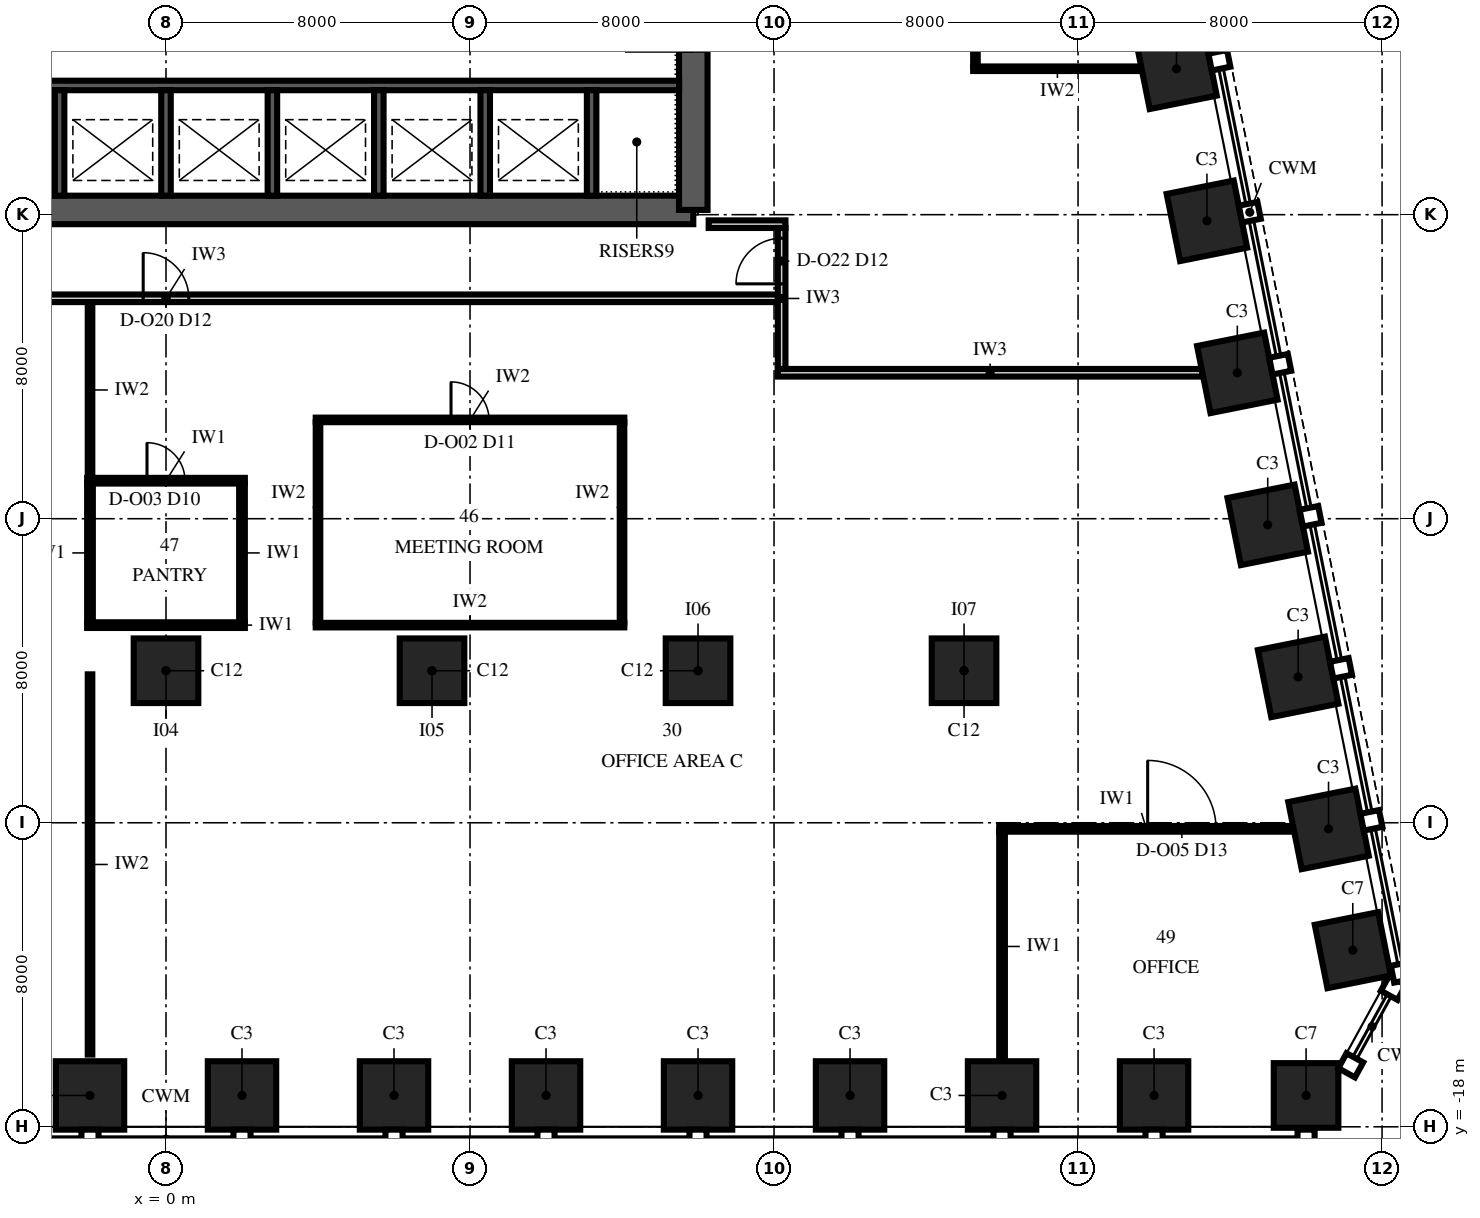
"""IFC4 building model, lengths in metres.
Left out: names, types, materials, properties, quantities, classifications, styles, units other than length and angle.
Written with IfcOpenShell. Run it as: python <this file> out.ifc"""

import sys

from ifc_helpers import new_model, si_unit, direction, frame, frame_2d, origin, origin_2d, place, context, subcontext, project, spatial, polyline, rectangle, outline, extrude, element, fill, save


model = new_model("IFC4")
c1 = context("Model", 3, precision=1e-05, world=origin(), true_north=direction((0.0, 1.0)))
c2 = subcontext(c1, "Body", "Model", "MODEL_VIEW")
j1 = project(units=[si_unit("LENGTHUNIT", "METRE"), si_unit("PLANEANGLEUNIT", "RADIAN")], contexts=[c1])
p1 = place(None, origin())
s1 = spatial("IfcSite", under=j1, at=p1, CompositionType="ELEMENT")
p2 = place(p1, origin())
s2 = spatial("IfcBuilding", under=s1, at=p2, CompositionType="ELEMENT")
p3 = place(p2, frame((0.0, 0.0, 115.0)))
s3 = spatial("IfcBuildingStorey", under=s2, at=p3, CompositionType="ELEMENT", Elevation=115.0)
for number, where, z_axis, x_axis in (
    (1, (-2.0, -17.175, 0.0), (0.0, 0.0, 1.0), (1.0, 0.0, 0.0)),
    (2, (2.0, -17.175, 0.0), (0.0, 0.0, 1.0), (1.0, 0.0, 0.0)),
    (3, (6.0, -17.175, 0.0), (0.0, 0.0, 1.0), (1.0, 0.0, 0.0)),
    (4, (10.0, -17.175, 0.0), (0.0, 0.0, 1.0), (1.0, 0.0, 0.0)),
    (5, (14.0, -17.175, 0.0), (0.0, 0.0, 1.0), (1.0, 0.0, 0.0)),
    (6, (18.0, -17.175, 0.0), (0.0, 0.0, 1.0), (1.0, 0.0, 0.0)),
    (7, (22.0, -17.175, 0.0), (0.0, 0.0, 1.0), (1.0, 0.0, 0.0)),
    (8, (26.0, -17.175, 0.0), (0.0, 0.0, 1.0), (1.0, 0.0, 0.0)),
):
    element("IfcColumn", number, at=place(p3, frame(where, z_axis=z_axis, x_axis=x_axis)), inside=s3, PredefinedType="COLUMN", context=c2, shape_type="SweptSolid", body=[
        extrude(rectangle(XDim=1.8, YDim=1.8, at=origin_2d()), origin(), (0.0, 0.0, 1.0), 4.0),
    ])
for number, where, z_axis, x_axis in (
    (9, (30.0, -17.175, 0.0), (0.0, 0.0, 1.0), (1.0, 0.0, 0.0)),
    (10, (31.229, -13.353, 0.0), (0.0, 0.0, 1.0), (-0.196, 0.981, 0.0)),
):
    element("IfcColumn", number, at=place(p3, frame(where, z_axis=z_axis, x_axis=x_axis)), inside=s3, PredefinedType="COLUMN", context=c2, shape_type="SweptSolid", body=[
        extrude(rectangle(XDim=1.7, YDim=1.7, at=origin_2d()), origin(), (0.0, 0.0, 1.0), 4.0),
    ])
for number, where, z_axis, x_axis in (
    (11, (30.591, -10.162, 0.0), (0.0, 0.0, 1.0), (-0.196, 0.981, 0.0)),
    (12, (29.791, -6.162, 0.0), (0.0, 0.0, 1.0), (-0.196, 0.981, 0.0)),
    (13, (28.991, -2.162, 0.0), (0.0, 0.0, 1.0), (-0.196, 0.981, 0.0)),
    (14, (28.191, 1.838, 0.0), (0.0, 0.0, 1.0), (-0.196, 0.981, 0.0)),
    (15, (27.391, 5.838, 0.0), (0.0, 0.0, 1.0), (-0.196, 0.981, 0.0)),
    (16, (26.591, 9.838, 0.0), (0.0, 0.0, 1.0), (-0.196, 0.981, 0.0)),
):
    element("IfcColumn", number, at=place(p3, frame(where, z_axis=z_axis, x_axis=x_axis)), inside=s3, PredefinedType="COLUMN", context=c2, shape_type="SweptSolid", body=[
        extrude(rectangle(XDim=1.8, YDim=1.8, at=origin_2d()), origin(), (0.0, 0.0, 1.0), 4.0),
    ])
for number, where, z_axis, x_axis in (
    (17, (0.0, -6.0, 0.0), (0.0, 0.0, 1.0), (1.0, 0.0, 0.0)),
    (18, (7.0, -6.0, 0.0), (0.0, 0.0, 1.0), (1.0, 0.0, 0.0)),
    (19, (14.0, -6.0, 0.0), (0.0, 0.0, 1.0), (1.0, 0.0, 0.0)),
    (20, (21.0, -6.0, 0.0), (0.0, 0.0, 1.0), (1.0, 0.0, 0.0)),
):
    element("IfcColumn", number, at=place(p3, frame(where, z_axis=z_axis, x_axis=x_axis)), inside=s3, PredefinedType="COLUMN", context=c2, shape_type="SweptSolid", body=[
        extrude(rectangle(XDim=1.7, YDim=1.7, at=origin_2d()), origin(), (0.0, 0.0, 1.0), 4.0),
    ])
p4 = place(p3, frame((-13.875, 6.125, 0.0), z_axis=(0.0, 0.0, 1.0), x_axis=(1.0, 0.0, 0.0)))
e21 = element("IfcWall", 21, at=p4, inside=s3, PredefinedType="SHEAR", context=c2, shape_type="SweptSolid", body=[
    extrude(rectangle(XDim=27.75, YDim=0.75, at=frame_2d((13.875, 0.0))), origin(), (0.0, 0.0, 1.0), 4.0),
])
p5 = place(p3, frame((13.875, 6.125, 0.0), z_axis=(0.0, 0.0, 1.0), x_axis=(0.0, 1.0, 0.0)))
e22 = element("IfcWall", 22, at=p5, inside=s3, PredefinedType="SHEAR", context=c2, shape_type="SweptSolid", body=[
    extrude(outline(polyline([(0.0, -0.375), (17.75, -0.375), (17.75, 0.0), (17.375, 0.0), (17.375, 0.375), (0.375, 0.375), (0.375, 0.0), (0.0, 0.0), (0.0, -0.375)])), origin(), (0.0, 0.0, 1.0), 4.0),
])
p6 = place(p5, frame((4.175, 0.0, 0.0)))
e23 = element("IfcOpeningElement", 23, at=p6, cuts=e22, PredefinedType="OPENING", context=c2, shape_type="SweptSolid", body=[
    extrude(rectangle(XDim=1.8, YDim=2.4, at=frame_2d((0.9, 1.2))), frame((0.0, 0.39, 0.0), z_axis=(0.0, -1.0, 0.0), x_axis=(1.0, 0.0, 0.0)), (0.0, 0.0, 1.0), 0.78),
])
p7 = place(p3, frame((-13.5, 9.4, 0.0), z_axis=(0.0, 0.0, 1.0), x_axis=(1.0, 0.0, 0.0)))
e24 = element("IfcWall", 24, at=p7, inside=s3, PredefinedType="SHEAR", context=c2, shape_type="SweptSolid", body=[
    extrude(rectangle(XDim=27.0, YDim=0.25, at=frame_2d((13.5, 0.0))), origin(), (0.0, 0.0, 1.0), 4.0),
])
p8 = place(p7, frame((0.35, 0.0, 0.0)))
e25 = element("IfcOpeningElement", 25, at=p8, cuts=e24, PredefinedType="OPENING", context=c2, shape_type="SweptSolid", body=[
    extrude(rectangle(XDim=1.1, YDim=2.1, at=frame_2d((0.55, 1.05))), frame((0.0, 0.14, 0.0), z_axis=(0.0, -1.0, 0.0), x_axis=(1.0, 0.0, 0.0)), (0.0, 0.0, 1.0), 0.28),
])
p9 = place(p7, frame((3.15, 0.0, 0.0)))
e26 = element("IfcOpeningElement", 26, at=p9, cuts=e24, PredefinedType="OPENING", context=c2, shape_type="SweptSolid", body=[
    extrude(rectangle(XDim=1.1, YDim=2.1, at=frame_2d((0.55, 1.05))), frame((0.0, 0.14, 0.0), z_axis=(0.0, -1.0, 0.0), x_axis=(1.0, 0.0, 0.0)), (0.0, 0.0, 1.0), 0.28),
])
p10 = place(p7, frame((5.95, 0.0, 0.0)))
e27 = element("IfcOpeningElement", 27, at=p10, cuts=e24, PredefinedType="OPENING", context=c2, shape_type="SweptSolid", body=[
    extrude(rectangle(XDim=1.1, YDim=2.1, at=frame_2d((0.55, 1.05))), frame((0.0, 0.14, 0.0), z_axis=(0.0, -1.0, 0.0), x_axis=(1.0, 0.0, 0.0)), (0.0, 0.0, 1.0), 0.28),
])
for number, where, z_axis, x_axis in (
    (28, (-2.8, 6.5, 0.0), (0.0, 0.0, 1.0), (0.0, 1.0, 0.0)),
    (29, (0.0, 6.5, 0.0), (0.0, 0.0, 1.0), (0.0, 1.0, 0.0)),
    (30, (2.8, 6.5, 0.0), (0.0, 0.0, 1.0), (0.0, 1.0, 0.0)),
    (31, (5.6, 6.5, 0.0), (0.0, 0.0, 1.0), (0.0, 1.0, 0.0)),
    (32, (8.4, 6.5, 0.0), (0.0, 0.0, 1.0), (0.0, 1.0, 0.0)),
    (33, (11.2, 6.5, 0.0), (0.0, 0.0, 1.0), (0.0, 1.0, 0.0)),
):
    element("IfcWall", number, at=place(p3, frame(where, z_axis=z_axis, x_axis=x_axis)), inside=s3, PredefinedType="SHEAR", context=c2, shape_type="SweptSolid", body=[
        extrude(rectangle(XDim=2.775, YDim=0.25, at=frame_2d((1.387, 0.0))), origin(), (0.0, 0.0, 1.0), 4.0),
    ])
p11 = place(p3, frame((21.925, -10.16, 0.0), z_axis=(0.0, 0.0, 1.0), x_axis=(1.0, 0.0, 0.0)))
e34 = element("IfcWall", 34, at=p11, inside=s3, PredefinedType="PARTITIONING", context=c2, shape_type="SweptSolid", body=[
    extrude(rectangle(XDim=7.748, YDim=0.15, at=frame_2d((3.874, 0.0))), origin(), (0.0, 0.0, 1.0), 3.25),
])
p12 = place(p11, frame((3.907, 0.0, 0.0)))
e35 = element("IfcOpeningElement", 35, at=p12, cuts=e34, PredefinedType="OPENING", context=c2, shape_type="SweptSolid", body=[
    extrude(rectangle(XDim=1.8, YDim=2.4, at=frame_2d((0.9, 1.2))), frame((0.0, 0.09, 0.0), z_axis=(0.0, -1.0, 0.0), x_axis=(1.0, 0.0, 0.0)), (0.0, 0.0, 1.0), 0.18),
])
p13 = place(p3, frame((-2.075, -4.8, 0.0), z_axis=(0.0, 0.0, 1.0), x_axis=(1.0, 0.0, 0.0)))
e36 = element("IfcWall", 36, at=p13, inside=s3, PredefinedType="PARTITIONING", context=c2, shape_type="SweptSolid", body=[
    extrude(rectangle(XDim=4.15, YDim=0.15, at=frame_2d((2.075, 0.0))), origin(), (0.0, 0.0, 1.0), 3.25),
])
p14 = place(p3, frame((3.94, -4.8, 0.0), z_axis=(0.0, 0.0, 1.0), x_axis=(1.0, 0.0, 0.0)))
e37 = element("IfcWall", 37, at=p14, inside=s3, PredefinedType="PARTITIONING", context=c2, shape_type="SweptSolid", body=[
    extrude(rectangle(XDim=8.12, YDim=0.12, at=frame_2d((4.06, 0.0))), origin(), (0.0, 0.0, 1.0), 3.25),
])
p15 = place(p3, frame((-2.075, -1.0, 0.0), z_axis=(0.0, 0.0, 1.0), x_axis=(1.0, 0.0, 0.0)))
e38 = element("IfcWall", 38, at=p15, inside=s3, PredefinedType="PARTITIONING", context=c2, shape_type="SweptSolid", body=[
    extrude(rectangle(XDim=4.15, YDim=0.15, at=frame_2d((2.075, 0.0))), origin(), (0.0, 0.0, 1.0), 3.85),
])
p16 = place(p15, frame((1.575, 0.0, 0.0)))
e39 = element("IfcOpeningElement", 39, at=p16, cuts=e38, PredefinedType="OPENING", context=c2, shape_type="SweptSolid", body=[
    extrude(rectangle(XDim=1.0, YDim=2.3, at=frame_2d((0.5, 1.15))), frame((0.0, 0.09, 0.0), z_axis=(0.0, -1.0, 0.0), x_axis=(1.0, 0.0, 0.0)), (0.0, 0.0, 1.0), 0.18),
])
p17 = place(p3, frame((3.94, 0.6, 0.0), z_axis=(0.0, 0.0, 1.0), x_axis=(1.0, 0.0, 0.0)))
e40 = element("IfcWall", 40, at=p17, inside=s3, PredefinedType="PARTITIONING", context=c2, shape_type="SweptSolid", body=[
    extrude(rectangle(XDim=8.12, YDim=0.12, at=frame_2d((4.06, 0.0))), origin(), (0.0, 0.0, 1.0), 3.25),
])
p18 = place(p17, frame((3.56, 0.0, 0.0)))
e41 = element("IfcOpeningElement", 41, at=p18, cuts=e40, PredefinedType="OPENING", context=c2, shape_type="SweptSolid", body=[
    extrude(rectangle(XDim=1.0, YDim=2.4, at=frame_2d((0.5, 1.2))), frame((0.0, 0.075, 0.0), z_axis=(0.0, -1.0, 0.0), x_axis=(1.0, 0.0, 0.0)), (0.0, 0.0, 1.0), 0.15),
])
p19 = place(p3, frame((16.1, 1.84, 0.0), z_axis=(0.0, 0.0, 1.0), x_axis=(1.0, 0.0, 0.0)))
e42 = element("IfcWall", 42, at=p19, inside=s3, PredefinedType="PARTITIONING", context=c2, shape_type="SweptSolid", body=[
    extrude(rectangle(XDim=11.173, YDim=0.2, at=frame_2d((5.586, 0.0))), origin(), (0.0, 0.0, 1.0), 3.25),
])
p20 = place(p3, frame((-16.1, 3.8, 0.0), z_axis=(0.0, 0.0, 1.0), x_axis=(1.0, 0.0, 0.0)))
e43 = element("IfcWall", 43, at=p20, inside=s3, PredefinedType="PARTITIONING", context=c2, shape_type="SweptSolid", body=[
    extrude(rectangle(XDim=32.2, YDim=0.2, at=frame_2d((16.1, 0.0))), origin(), (0.0, 0.0, 1.0), 3.25),
])
p21 = place(p20, frame((15.5, 0.0, 0.0)))
e44 = element("IfcOpeningElement", 44, at=p21, cuts=e43, PredefinedType="OPENING", context=c2, shape_type="SweptSolid", body=[
    extrude(rectangle(XDim=1.2, YDim=2.4, at=frame_2d((0.6, 1.2))), frame((0.0, 0.115, 0.0), z_axis=(0.0, -1.0, 0.0), x_axis=(1.0, 0.0, 0.0)), (0.0, 0.0, 1.0), 0.23),
])
p22 = place(p3, frame((14.28, 5.75, 0.0), z_axis=(0.0, 0.0, 1.0), x_axis=(1.0, 0.0, 0.0)))
e45 = element("IfcWall", 45, at=p22, inside=s3, PredefinedType="PARTITIONING", context=c2, shape_type="SweptSolid", body=[
    extrude(rectangle(XDim=2.02, YDim=0.2, at=frame_2d((1.01, 0.0))), origin(), (0.0, 0.0, 1.0), 3.85),
])
p23 = place(p3, frame((21.24, 9.84, 0.0), z_axis=(0.0, 0.0, 1.0), x_axis=(1.0, 0.0, 0.0)))
e46 = element("IfcWall", 46, at=p23, inside=s3, PredefinedType="PARTITIONING", context=c2, shape_type="SweptSolid", body=[
    extrude(rectangle(XDim=4.433, YDim=0.12, at=frame_2d((2.216, 0.0))), origin(), (0.0, 0.0, 1.0), 3.25),
])
for number, where, z_axis, x_axis in (
    (47, (-2.0, -4.725, 0.0), (0.0, 0.0, 1.0), (0.0, 1.0, 0.0)),
    (48, (2.0, -4.725, 0.0), (0.0, 0.0, 1.0), (0.0, 1.0, 0.0)),
):
    element("IfcWall", number, at=place(p3, frame(where, z_axis=z_axis, x_axis=x_axis)), inside=s3, PredefinedType="PARTITIONING", context=c2, shape_type="SweptSolid", body=[
        extrude(rectangle(XDim=3.65, YDim=0.15, at=frame_2d((1.825, 0.0))), origin(), (0.0, 0.0, 1.0), 3.25),
    ])
for number, where, z_axis, x_axis in (
    (49, (4.0, -4.74, 0.0), (0.0, 0.0, 1.0), (0.0, 1.0, 0.0)),
    (50, (12.0, -4.74, 0.0), (0.0, 0.0, 1.0), (0.0, 1.0, 0.0)),
):
    element("IfcWall", number, at=place(p3, frame(where, z_axis=z_axis, x_axis=x_axis)), inside=s3, PredefinedType="PARTITIONING", context=c2, shape_type="SweptSolid", body=[
        extrude(rectangle(XDim=5.28, YDim=0.12, at=frame_2d((2.64, 0.0))), origin(), (0.0, 0.0, 1.0), 3.85),
    ])
p24 = place(p3, frame((16.2, 1.94, 0.0), z_axis=(0.0, 0.0, 1.0), x_axis=(0.0, 1.0, 0.0)))
e51 = element("IfcWall", 51, at=p24, inside=s3, PredefinedType="PARTITIONING", context=c2, shape_type="SweptSolid", body=[
    extrude(rectangle(XDim=3.71, YDim=0.2, at=frame_2d((1.855, 0.0))), origin(), (0.0, 0.0, 1.0), 3.85),
])
p25 = place(p24, frame((2.24, 0.0, 0.0)))
e52 = element("IfcOpeningElement", 52, at=p25, cuts=e51, PredefinedType="OPENING", context=c2, shape_type="SweptSolid", body=[
    extrude(rectangle(XDim=1.2, YDim=2.4, at=frame_2d((0.6, 1.2))), frame((0.0, 0.115, 0.0), z_axis=(0.0, -1.0, 0.0), x_axis=(1.0, 0.0, 0.0)), (0.0, 0.0, 1.0), 0.23),
])
p26 = place(p3, frame((21.3, 9.9, 0.0), z_axis=(0.0, 0.0, 1.0), x_axis=(0.0, 1.0, 0.0)))
e53 = element("IfcWall", 53, at=p26, inside=s3, PredefinedType="PARTITIONING", context=c2, shape_type="SweptSolid", body=[
    extrude(rectangle(XDim=3.88, YDim=0.12, at=frame_2d((1.94, 0.0))), origin(), (0.0, 0.0, 1.0), 3.85),
])
p27 = place(p26, frame((1.44, 0.0, 0.0)))
e54 = element("IfcOpeningElement", 54, at=p27, cuts=e53, PredefinedType="OPENING", context=c2, shape_type="SweptSolid", body=[
    extrude(rectangle(XDim=1.0, YDim=2.4, at=frame_2d((0.5, 1.2))), frame((0.0, 0.075, 0.0), z_axis=(0.0, -1.0, 0.0), x_axis=(1.0, 0.0, 0.0)), (0.0, 0.0, 1.0), 0.15),
])
p28 = place(p3, frame((22.0, -16.275, 0.0), z_axis=(0.0, 0.0, 1.0), x_axis=(0.0, 1.0, 0.0)))
e55 = element("IfcWall", 55, at=p28, inside=s3, PredefinedType="PARTITIONING", context=c2, shape_type="SweptSolid", body=[
    extrude(rectangle(XDim=6.04, YDim=0.15, at=frame_2d((3.02, 0.0))), origin(), (0.0, 0.0, 1.0), 3.25),
])
p29 = place(p3, frame((-1.999, -16.1, 0.0), z_axis=(0.0, 0.0, 1.0), x_axis=(0.0, 1.0, 0.0)))
e56 = element("IfcWall", 56, at=p29, inside=s3, PredefinedType="PARTITIONING", context=c2, shape_type="SweptSolid", body=[
    extrude(rectangle(XDim=10.005, YDim=0.12, at=frame_2d((5.002, 0.0))), origin(), (0.0, 0.0, 1.0), 2.842),
])
p30 = place(p3, frame((-1.999, -0.905, 0.0), z_axis=(0.0, 0.0, 1.0), x_axis=(0.0, 1.0, 0.0)))
e57 = element("IfcWall", 57, at=p30, inside=s3, PredefinedType="PARTITIONING", context=c2, shape_type="SweptSolid", body=[
    extrude(rectangle(XDim=4.585, YDim=0.12, at=frame_2d((2.292, 0.0))), origin(), (0.0, 0.0, 1.0), 3.85),
])
p31 = place(p18, origin())
e58 = element("IfcDoor", 58, at=p31, inside=s3, OperationType="SINGLE_SWING_RIGHT", PredefinedType="DOOR", context=c2, shape_type="SweptSolid", body=[
    extrude(rectangle(XDim=1.0, YDim=2.4, at=frame_2d((0.5, 1.2))), frame((0.0, 0.06, 0.0), z_axis=(0.0, -1.0, 0.0), x_axis=(1.0, 0.0, 0.0)), (0.0, 0.0, 1.0), 0.12),
])
fill(e41, e58)
p32 = place(p16, origin())
e59 = element("IfcDoor", 59, at=p32, inside=s3, OperationType="SINGLE_SWING_LEFT", PredefinedType="DOOR", context=c2, shape_type="SweptSolid", body=[
    extrude(rectangle(XDim=1.0, YDim=2.3, at=frame_2d((0.5, 1.15))), frame((0.0, 0.075, 0.0), z_axis=(0.0, -1.0, 0.0), x_axis=(1.0, 0.0, 0.0)), (0.0, 0.0, 1.0), 0.149),
])
fill(e39, e59)
p33 = place(p12, origin())
e60 = element("IfcDoor", 60, at=p33, inside=s3, OperationType="DOUBLE_DOOR_SINGLE_SWING", PredefinedType="DOOR", context=c2, shape_type="SweptSolid", body=[
    extrude(rectangle(XDim=1.8, YDim=2.4, at=frame_2d((0.9, 1.2))), frame((0.0, 0.075, 0.0), z_axis=(0.0, -1.0, 0.0), x_axis=(1.0, 0.0, 0.0)), (0.0, 0.0, 1.0), 0.149),
])
fill(e35, e60)
p34 = place(p21, origin())
e61 = element("IfcDoor", 61, at=p34, inside=s3, OperationType="SINGLE_SWING_LEFT", PredefinedType="DOOR", context=c2, shape_type="SweptSolid", body=[
    extrude(rectangle(XDim=1.2, YDim=2.4, at=frame_2d((0.6, 1.2))), frame((0.0, 0.1, 0.0), z_axis=(0.0, -1.0, 0.0), x_axis=(1.0, 0.0, 0.0)), (0.0, 0.0, 1.0), 0.199),
])
fill(e44, e61)
p35 = place(p25, origin())
e62 = element("IfcDoor", 62, at=p35, inside=s3, OperationType="SINGLE_SWING_LEFT", PredefinedType="DOOR", context=c2, shape_type="SweptSolid", body=[
    extrude(rectangle(XDim=1.2, YDim=2.4, at=frame_2d((0.6, 1.2))), frame((0.0, 0.1, 0.0), z_axis=(0.0, -1.0, 0.0), x_axis=(1.0, 0.0, 0.0)), (0.0, 0.0, 1.0), 0.199),
])
fill(e52, e62)
save(model, sys.argv[1])
